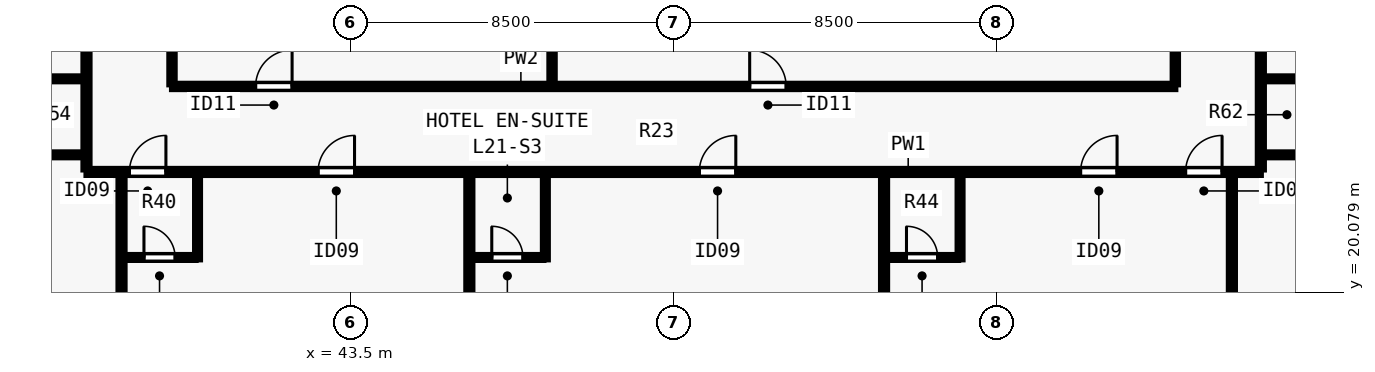
"""IFC4 building model, lengths in metres.
Left out: names, types, materials, properties, quantities, classifications, styles, units other than length and angle.
Written with IfcOpenShell. Run it as: python <this file> out.ifc"""

import sys

from ifc_helpers import new_model, si_unit, direction, frame, frame_2d, origin, place, context, subcontext, project, spatial, rectangle, extrude, element, fill, save


model = new_model("IFC4")
c1 = context("Model", 3, precision=1e-05, world=origin(), true_north=direction((0.0, 1.0)))
c2 = subcontext(c1, "Body", "Model", "MODEL_VIEW")
j1 = project(units=[si_unit("LENGTHUNIT", "METRE"), si_unit("PLANEANGLEUNIT", "RADIAN")], contexts=[c1])
p1 = place(None, origin())
s1 = spatial("IfcSite", under=j1, at=p1, CompositionType="ELEMENT")
p2 = place(p1, origin())
s2 = spatial("IfcBuilding", under=s1, at=p2, CompositionType="ELEMENT")
p3 = place(p2, frame((0.0, 0.0, 79.5)))
s3 = spatial("IfcBuildingStorey", under=s2, at=p3, CompositionType="ELEMENT", Elevation=79.5)
p4 = place(p3, frame((36.55, 23.25, 0.0), z_axis=(0.0, 0.0, 1.0), x_axis=(1.0, 0.0, 0.0)))
e1 = element("IfcWall", 1, at=p4, inside=s3, PredefinedType="PARTITIONING", context=c2, shape_type="SweptSolid", body=[
    extrude(rectangle(XDim=30.9, YDim=0.16, at=frame_2d((15.45, 0.0))), origin(), (0.0, 0.0, 1.0), 3.28),
])
p5 = place(p4, frame((1.13, 0.0, 0.0)))
e2 = element("IfcOpeningElement", 2, at=p5, cuts=e1, PredefinedType="OPENING", context=c2, shape_type="SweptSolid", body=[
    extrude(rectangle(XDim=0.96, YDim=2.15, at=frame_2d((0.48, 1.075))), frame((0.0, 0.09, 0.0), z_axis=(0.0, -1.0, 0.0), x_axis=(1.0, 0.0, 0.0)), (0.0, 0.0, 1.0), 0.18),
])
p6 = place(p4, frame((6.093, 0.0, 0.0)))
e3 = element("IfcOpeningElement", 3, at=p6, cuts=e1, PredefinedType="OPENING", context=c2, shape_type="SweptSolid", body=[
    extrude(rectangle(XDim=0.96, YDim=2.15, at=frame_2d((0.48, 1.075))), frame((0.0, 0.09, 0.0), z_axis=(0.0, -1.0, 0.0), x_axis=(1.0, 0.0, 0.0)), (0.0, 0.0, 1.0), 0.18),
])
p7 = place(p4, frame((16.125, 0.0, 0.0)))
e4 = element("IfcOpeningElement", 4, at=p7, cuts=e1, PredefinedType="OPENING", context=c2, shape_type="SweptSolid", body=[
    extrude(rectangle(XDim=0.96, YDim=2.15, at=frame_2d((0.48, 1.075))), frame((0.0, 0.09, 0.0), z_axis=(0.0, -1.0, 0.0), x_axis=(1.0, 0.0, 0.0)), (0.0, 0.0, 1.0), 0.18),
])
p8 = place(p4, frame((26.157, 0.0, 0.0)))
e5 = element("IfcOpeningElement", 5, at=p8, cuts=e1, PredefinedType="OPENING", context=c2, shape_type="SweptSolid", body=[
    extrude(rectangle(XDim=0.96, YDim=2.15, at=frame_2d((0.48, 1.075))), frame((0.0, 0.09, 0.0), z_axis=(0.0, -1.0, 0.0), x_axis=(1.0, 0.0, 0.0)), (0.0, 0.0, 1.0), 0.18),
])
p9 = place(p4, frame((28.92, 0.0, 0.0)))
e6 = element("IfcOpeningElement", 6, at=p9, cuts=e1, PredefinedType="OPENING", context=c2, shape_type="SweptSolid", body=[
    extrude(rectangle(XDim=0.96, YDim=2.15, at=frame_2d((0.48, 1.075))), frame((0.0, 0.09, 0.0), z_axis=(0.0, -1.0, 0.0), x_axis=(1.0, 0.0, 0.0)), (0.0, 0.0, 1.0), 0.18),
])
p10 = place(p3, frame((36.55, 23.315, 0.0), z_axis=(0.0, 0.0, 1.0), x_axis=(0.0, 1.0, 0.0)))
e7 = element("IfcWall", 7, at=p10, inside=s3, PredefinedType="PARTITIONING", context=c2, shape_type="SweptSolid", body=[
    extrude(rectangle(XDim=31.37, YDim=0.16, at=frame_2d((15.685, 0.0))), origin(), (0.0, 0.0, 1.0), 3.28),
])
p11 = place(p10, frame((4.848, 0.0, 0.0)))
e8 = element("IfcOpeningElement", 8, at=p11, cuts=e7, PredefinedType="OPENING", context=c2, shape_type="SweptSolid", body=[
    extrude(rectangle(XDim=0.96, YDim=2.15, at=frame_2d((0.48, 1.075))), frame((0.0, 0.09, 0.0), z_axis=(0.0, -1.0, 0.0), x_axis=(1.0, 0.0, 0.0)), (0.0, 0.0, 1.0), 0.18),
])
p12 = place(p10, frame((12.39, 0.0, 0.0)))
e9 = element("IfcOpeningElement", 9, at=p12, cuts=e7, PredefinedType="OPENING", context=c2, shape_type="SweptSolid", body=[
    extrude(rectangle(XDim=0.96, YDim=2.15, at=frame_2d((0.48, 1.075))), frame((0.0, 0.09, 0.0), z_axis=(0.0, -1.0, 0.0), x_axis=(1.0, 0.0, 0.0)), (0.0, 0.0, 1.0), 0.18),
])
p13 = place(p10, frame((20.265, 0.0, 0.0)))
e10 = element("IfcOpeningElement", 10, at=p13, cuts=e7, PredefinedType="OPENING", context=c2, shape_type="SweptSolid", body=[
    extrude(rectangle(XDim=0.96, YDim=2.15, at=frame_2d((0.48, 1.075))), frame((0.0, 0.09, 0.0), z_axis=(0.0, -1.0, 0.0), x_axis=(1.0, 0.0, 0.0)), (0.0, 0.0, 1.0), 0.18),
])
p14 = place(p10, frame((28.223, 0.0, 0.0)))
e11 = element("IfcOpeningElement", 11, at=p14, cuts=e7, PredefinedType="OPENING", context=c2, shape_type="SweptSolid", body=[
    extrude(rectangle(XDim=0.96, YDim=2.15, at=frame_2d((0.48, 1.075))), frame((0.0, 0.09, 0.0), z_axis=(0.0, -1.0, 0.0), x_axis=(1.0, 0.0, 0.0)), (0.0, 0.0, 1.0), 0.18),
])
p15 = place(p3, frame((67.45, 23.315, 0.0), z_axis=(0.0, 0.0, 1.0), x_axis=(0.0, 1.0, 0.0)))
e12 = element("IfcWall", 12, at=p15, inside=s3, PredefinedType="PARTITIONING", context=c2, shape_type="SweptSolid", body=[
    extrude(rectangle(XDim=31.37, YDim=0.16, at=frame_2d((15.685, 0.0))), origin(), (0.0, 0.0, 1.0), 3.28),
])
p16 = place(p15, frame((8.474, 0.0, 0.0)))
e13 = element("IfcOpeningElement", 13, at=p16, cuts=e12, PredefinedType="OPENING", context=c2, shape_type="SweptSolid", body=[
    extrude(rectangle(XDim=0.96, YDim=2.15, at=frame_2d((0.48, 1.075))), frame((0.0, 0.09, 0.0), z_axis=(0.0, -1.0, 0.0), x_axis=(1.0, 0.0, 0.0)), (0.0, 0.0, 1.0), 0.18),
])
p17 = place(p15, frame((23.974, 0.0, 0.0)))
e14 = element("IfcOpeningElement", 14, at=p17, cuts=e12, PredefinedType="OPENING", context=c2, shape_type="SweptSolid", body=[
    extrude(rectangle(XDim=0.96, YDim=2.15, at=frame_2d((0.48, 1.075))), frame((0.0, 0.09, 0.0), z_axis=(0.0, -1.0, 0.0), x_axis=(1.0, 0.0, 0.0)), (0.0, 0.0, 1.0), 0.18),
])
p18 = place(p3, frame((38.8, 25.5, 0.0), z_axis=(0.0, 0.0, 1.0), x_axis=(1.0, 0.0, 0.0)))
e15 = element("IfcWall", 15, at=p18, inside=s3, PredefinedType="PARTITIONING", context=c2, shape_type="SweptSolid", body=[
    extrude(rectangle(XDim=26.4, YDim=0.14, at=frame_2d((13.2, 0.0))), origin(), (0.0, 0.0, 1.0), 3.28),
])
p19 = place(p18, frame((2.2, 0.0, 0.0)))
e16 = element("IfcOpeningElement", 16, at=p19, cuts=e15, PredefinedType="OPENING", context=c2, shape_type="SweptSolid", body=[
    extrude(rectangle(XDim=0.96, YDim=2.12, at=frame_2d((0.48, 1.06))), frame((0.0, 0.08, 0.0), z_axis=(0.0, -1.0, 0.0), x_axis=(1.0, 0.0, 0.0)), (0.0, 0.0, 1.0), 0.16),
])
p20 = place(p18, frame((15.2, 0.0, 0.0)))
e17 = element("IfcOpeningElement", 17, at=p20, cuts=e15, PredefinedType="OPENING", context=c2, shape_type="SweptSolid", body=[
    extrude(rectangle(XDim=0.96, YDim=2.12, at=frame_2d((0.48, 1.06))), frame((0.0, 0.08, 0.0), z_axis=(0.0, -1.0, 0.0), x_axis=(1.0, 0.0, 0.0)), (0.0, 0.0, 1.0), 0.16),
])
p21 = place(p3, frame((38.8, 25.555, 0.0), z_axis=(0.0, 0.0, 1.0), x_axis=(0.0, 1.0, 0.0)))
e18 = element("IfcWall", 18, at=p21, inside=s3, PredefinedType="PARTITIONING", context=c2, shape_type="SweptSolid", body=[
    extrude(rectangle(XDim=13.195, YDim=0.14, at=frame_2d((6.598, 0.0))), origin(), (0.0, 0.0, 1.0), 3.28),
])
p22 = place(p21, frame((1.045, 0.0, 0.0)))
e19 = element("IfcOpeningElement", 19, at=p22, cuts=e18, PredefinedType="OPENING", context=c2, shape_type="SweptSolid", body=[
    extrude(rectangle(XDim=0.88, YDim=2.1, at=frame_2d((0.44, 1.05))), frame((0.0, 0.08, 0.0), z_axis=(0.0, -1.0, 0.0), x_axis=(1.0, 0.0, 0.0)), (0.0, 0.0, 1.0), 0.16),
])
p23 = place(p21, frame((10.245, 0.0, 0.0)))
e20 = element("IfcOpeningElement", 20, at=p23, cuts=e18, PredefinedType="OPENING", context=c2, shape_type="SweptSolid", body=[
    extrude(rectangle(XDim=0.88, YDim=2.1, at=frame_2d((0.44, 1.05))), frame((0.0, 0.08, 0.0), z_axis=(0.0, -1.0, 0.0), x_axis=(1.0, 0.0, 0.0)), (0.0, 0.0, 1.0), 0.16),
])
p24 = place(p3, frame((65.2, 25.555, 0.0), z_axis=(0.0, 0.0, 1.0), x_axis=(0.0, 1.0, 0.0)))
e21 = element("IfcWall", 21, at=p24, inside=s3, PredefinedType="PARTITIONING", context=c2, shape_type="SweptSolid", body=[
    extrude(rectangle(XDim=13.195, YDim=0.14, at=frame_2d((6.598, 0.0))), origin(), (0.0, 0.0, 1.0), 3.28),
])
p25 = place(p24, frame((2.445, 0.0, 0.0)))
e22 = element("IfcOpeningElement", 22, at=p25, cuts=e21, PredefinedType="OPENING", context=c2, shape_type="SweptSolid", body=[
    extrude(rectangle(XDim=0.88, YDim=2.1, at=frame_2d((0.44, 1.05))), frame((0.0, 0.08, 0.0), z_axis=(0.0, -1.0, 0.0), x_axis=(1.0, 0.0, 0.0)), (0.0, 0.0, 1.0), 0.16),
])
p26 = place(p3, frame((48.8, 25.555, 0.0), z_axis=(0.0, 0.0, 1.0), x_axis=(0.0, 1.0, 0.0)))
e23 = element("IfcWall", 23, at=p26, inside=s3, PredefinedType="PARTITIONING", context=c2, shape_type="SweptSolid", body=[
    extrude(rectangle(XDim=4.685, YDim=0.14, at=frame_2d((2.343, 0.0))), origin(), (0.0, 0.0, 1.0), 3.28),
])
p27 = place(p3, frame((37.472, 13.845, 0.0), z_axis=(0.0, 0.0, 1.0), x_axis=(0.0, 1.0, 0.0)))
e24 = element("IfcWall", 24, at=p27, inside=s3, PredefinedType="PARTITIONING", context=c2, shape_type="SweptSolid", body=[
    extrude(rectangle(XDim=9.34, YDim=0.16, at=frame_2d((4.67, 0.0))), origin(), (0.0, 0.0, 1.0), 3.28),
])
p28 = place(p3, frame((39.472, 20.95, 0.0), z_axis=(0.0, 0.0, 1.0), x_axis=(0.0, 1.0, 0.0)))
e25 = element("IfcWall", 25, at=p28, inside=s3, PredefinedType="PLUMBINGWALL", context=c2, shape_type="SweptSolid", body=[
    extrude(rectangle(XDim=2.235, YDim=0.13, at=frame_2d((1.118, 0.0))), origin(), (0.0, 0.0, 1.0), 3.28),
])
p29 = place(p3, frame((37.537, 21.0, 0.0), z_axis=(0.0, 0.0, 1.0), x_axis=(1.0, 0.0, 0.0)))
e26 = element("IfcWall", 26, at=p29, inside=s3, PredefinedType="PLUMBINGWALL", context=c2, shape_type="SweptSolid", body=[
    extrude(rectangle(XDim=1.885, YDim=0.13, at=frame_2d((0.942, 0.0))), origin(), (0.0, 0.0, 1.0), 3.28),
])
p30 = place(p29, frame((0.525, 0.0, 0.0)))
e27 = element("IfcOpeningElement", 27, at=p30, cuts=e26, PredefinedType="OPENING", context=c2, shape_type="SweptSolid", body=[
    extrude(rectangle(XDim=0.82, YDim=2.1, at=frame_2d((0.41, 1.05))), frame((0.0, 0.075, 0.0), z_axis=(0.0, -1.0, 0.0), x_axis=(1.0, 0.0, 0.0)), (0.0, 0.0, 1.0), 0.15),
])
p31 = place(p3, frame((46.624, 13.845, 0.0), z_axis=(0.0, 0.0, 1.0), x_axis=(0.0, 1.0, 0.0)))
e28 = element("IfcWall", 28, at=p31, inside=s3, PredefinedType="PARTITIONING", context=c2, shape_type="SweptSolid", body=[
    extrude(rectangle(XDim=9.34, YDim=0.16, at=frame_2d((4.67, 0.0))), origin(), (0.0, 0.0, 1.0), 3.28),
])
p32 = place(p3, frame((48.624, 20.95, 0.0), z_axis=(0.0, 0.0, 1.0), x_axis=(0.0, 1.0, 0.0)))
e29 = element("IfcWall", 29, at=p32, inside=s3, PredefinedType="PLUMBINGWALL", context=c2, shape_type="SweptSolid", body=[
    extrude(rectangle(XDim=2.235, YDim=0.13, at=frame_2d((1.118, 0.0))), origin(), (0.0, 0.0, 1.0), 3.28),
])
p33 = place(p3, frame((46.689, 21.0, 0.0), z_axis=(0.0, 0.0, 1.0), x_axis=(1.0, 0.0, 0.0)))
e30 = element("IfcWall", 30, at=p33, inside=s3, PredefinedType="PLUMBINGWALL", context=c2, shape_type="SweptSolid", body=[
    extrude(rectangle(XDim=1.885, YDim=0.13, at=frame_2d((0.942, 0.0))), origin(), (0.0, 0.0, 1.0), 3.28),
])
p34 = place(p33, frame((0.525, 0.0, 0.0)))
e31 = element("IfcOpeningElement", 31, at=p34, cuts=e30, PredefinedType="OPENING", context=c2, shape_type="SweptSolid", body=[
    extrude(rectangle(XDim=0.82, YDim=2.1, at=frame_2d((0.41, 1.05))), frame((0.0, 0.075, 0.0), z_axis=(0.0, -1.0, 0.0), x_axis=(1.0, 0.0, 0.0)), (0.0, 0.0, 1.0), 0.15),
])
p35 = place(p3, frame((57.536, 13.845, 0.0), z_axis=(0.0, 0.0, 1.0), x_axis=(0.0, 1.0, 0.0)))
e32 = element("IfcWall", 32, at=p35, inside=s3, PredefinedType="PARTITIONING", context=c2, shape_type="SweptSolid", body=[
    extrude(rectangle(XDim=9.34, YDim=0.16, at=frame_2d((4.67, 0.0))), origin(), (0.0, 0.0, 1.0), 3.28),
])
p36 = place(p3, frame((59.536, 20.95, 0.0), z_axis=(0.0, 0.0, 1.0), x_axis=(0.0, 1.0, 0.0)))
e33 = element("IfcWall", 33, at=p36, inside=s3, PredefinedType="PLUMBINGWALL", context=c2, shape_type="SweptSolid", body=[
    extrude(rectangle(XDim=2.235, YDim=0.13, at=frame_2d((1.118, 0.0))), origin(), (0.0, 0.0, 1.0), 3.28),
])
p37 = place(p3, frame((57.601, 21.0, 0.0), z_axis=(0.0, 0.0, 1.0), x_axis=(1.0, 0.0, 0.0)))
e34 = element("IfcWall", 34, at=p37, inside=s3, PredefinedType="PLUMBINGWALL", context=c2, shape_type="SweptSolid", body=[
    extrude(rectangle(XDim=1.885, YDim=0.13, at=frame_2d((0.942, 0.0))), origin(), (0.0, 0.0, 1.0), 3.28),
])
p38 = place(p37, frame((0.525, 0.0, 0.0)))
e35 = element("IfcOpeningElement", 35, at=p38, cuts=e34, PredefinedType="OPENING", context=c2, shape_type="SweptSolid", body=[
    extrude(rectangle(XDim=0.82, YDim=2.1, at=frame_2d((0.41, 1.05))), frame((0.0, 0.075, 0.0), z_axis=(0.0, -1.0, 0.0), x_axis=(1.0, 0.0, 0.0)), (0.0, 0.0, 1.0), 0.15),
])
p39 = place(p3, frame((66.688, 13.845, 0.0), z_axis=(0.0, 0.0, 1.0), x_axis=(0.0, 1.0, 0.0)))
e36 = element("IfcWall", 36, at=p39, inside=s3, PredefinedType="PARTITIONING", context=c2, shape_type="SweptSolid", body=[
    extrude(rectangle(XDim=9.34, YDim=0.16, at=frame_2d((4.67, 0.0))), origin(), (0.0, 0.0, 1.0), 2.439),
])
p40 = place(p3, frame((34.25, 23.7, 0.0), z_axis=(0.0, 0.0, 1.0), x_axis=(1.0, 0.0, 0.0)))
e37 = element("IfcWall", 37, at=p40, inside=s3, PredefinedType="PLUMBINGWALL", context=c2, shape_type="SweptSolid", body=[
    extrude(rectangle(XDim=2.235, YDim=0.13, at=frame_2d((1.118, 0.0))), origin(), (0.0, 0.0, 1.0), 2.849),
])
p41 = place(p3, frame((34.25, 25.7, 0.0), z_axis=(0.0, 0.0, 1.0), x_axis=(1.0, 0.0, 0.0)))
e38 = element("IfcWall", 38, at=p41, inside=s3, PredefinedType="PLUMBINGWALL", context=c2, shape_type="SweptSolid", body=[
    extrude(rectangle(XDim=2.235, YDim=0.13, at=frame_2d((1.118, 0.0))), origin(), (0.0, 0.0, 1.0), 3.28),
])
p42 = place(p3, frame((67.515, 23.7, 0.0), z_axis=(0.0, 0.0, 1.0), x_axis=(1.0, 0.0, 0.0)))
e39 = element("IfcWall", 39, at=p42, inside=s3, PredefinedType="PLUMBINGWALL", context=c2, shape_type="SweptSolid", body=[
    extrude(rectangle(XDim=2.235, YDim=0.13, at=frame_2d((1.118, 0.0))), origin(), (0.0, 0.0, 1.0), 2.849),
])
p43 = place(p3, frame((67.515, 25.7, 0.0), z_axis=(0.0, 0.0, 1.0), x_axis=(1.0, 0.0, 0.0)))
e40 = element("IfcWall", 40, at=p43, inside=s3, PredefinedType="PLUMBINGWALL", context=c2, shape_type="SweptSolid", body=[
    extrude(rectangle(XDim=2.235, YDim=0.13, at=frame_2d((1.118, 0.0))), origin(), (0.0, 0.0, 1.0), 3.28),
])
p44 = place(p19, origin())
e41 = element("IfcDoor", 41, at=p44, inside=s3, OperationType="SINGLE_SWING_RIGHT", PredefinedType="DOOR", context=c2, shape_type="SweptSolid", body=[
    extrude(rectangle(XDim=0.96, YDim=2.12, at=frame_2d((0.48, 1.06))), frame((0.0, 0.025, 0.0), z_axis=(0.0, -1.0, 0.0), x_axis=(1.0, 0.0, 0.0)), (0.0, 0.0, 1.0), 0.05),
])
fill(e16, e41)
p45 = place(p20, origin())
e42 = element("IfcDoor", 42, at=p45, inside=s3, OperationType="SINGLE_SWING_LEFT", PredefinedType="DOOR", context=c2, shape_type="SweptSolid", body=[
    extrude(rectangle(XDim=0.96, YDim=2.12, at=frame_2d((0.48, 1.06))), frame((0.0, 0.025, 0.0), z_axis=(0.0, -1.0, 0.0), x_axis=(1.0, 0.0, 0.0)), (0.0, 0.0, 1.0), 0.05),
])
fill(e17, e42)
p46 = place(p5, origin())
e43 = element("IfcDoor", 43, at=p46, inside=s3, OperationType="SINGLE_SWING_RIGHT", PredefinedType="DOOR", context=c2, shape_type="SweptSolid", body=[
    extrude(rectangle(XDim=0.96, YDim=2.15, at=frame_2d((0.48, 1.075))), frame((0.0, 0.025, 0.0), z_axis=(0.0, -1.0, 0.0), x_axis=(1.0, 0.0, 0.0)), (0.0, 0.0, 1.0), 0.05),
])
fill(e2, e43)
p47 = place(p30, origin())
e44 = element("IfcDoor", 44, at=p47, inside=s3, OperationType="SINGLE_SWING_LEFT", PredefinedType="DOOR", context=c2, shape_type="SweptSolid", body=[
    extrude(rectangle(XDim=0.82, YDim=2.1, at=frame_2d((0.41, 1.05))), frame((0.0, 0.025, 0.0), z_axis=(0.0, -1.0, 0.0), x_axis=(1.0, 0.0, 0.0)), (0.0, 0.0, 1.0), 0.05),
])
fill(e27, e44)
p48 = place(p6, origin())
e45 = element("IfcDoor", 45, at=p48, inside=s3, OperationType="SINGLE_SWING_RIGHT", PredefinedType="DOOR", context=c2, shape_type="SweptSolid", body=[
    extrude(rectangle(XDim=0.96, YDim=2.15, at=frame_2d((0.48, 1.075))), frame((0.0, 0.025, 0.0), z_axis=(0.0, -1.0, 0.0), x_axis=(1.0, 0.0, 0.0)), (0.0, 0.0, 1.0), 0.05),
])
fill(e3, e45)
p49 = place(p34, origin())
e46 = element("IfcDoor", 46, at=p49, inside=s3, OperationType="SINGLE_SWING_LEFT", PredefinedType="DOOR", context=c2, shape_type="SweptSolid", body=[
    extrude(rectangle(XDim=0.82, YDim=2.1, at=frame_2d((0.41, 1.05))), frame((0.0, 0.025, 0.0), z_axis=(0.0, -1.0, 0.0), x_axis=(1.0, 0.0, 0.0)), (0.0, 0.0, 1.0), 0.05),
])
fill(e31, e46)
p50 = place(p7, origin())
e47 = element("IfcDoor", 47, at=p50, inside=s3, OperationType="SINGLE_SWING_RIGHT", PredefinedType="DOOR", context=c2, shape_type="SweptSolid", body=[
    extrude(rectangle(XDim=0.96, YDim=2.15, at=frame_2d((0.48, 1.075))), frame((0.0, 0.025, 0.0), z_axis=(0.0, -1.0, 0.0), x_axis=(1.0, 0.0, 0.0)), (0.0, 0.0, 1.0), 0.05),
])
fill(e4, e47)
p51 = place(p38, origin())
e48 = element("IfcDoor", 48, at=p51, inside=s3, OperationType="SINGLE_SWING_LEFT", PredefinedType="DOOR", context=c2, shape_type="SweptSolid", body=[
    extrude(rectangle(XDim=0.82, YDim=2.1, at=frame_2d((0.41, 1.05))), frame((0.0, 0.025, 0.0), z_axis=(0.0, -1.0, 0.0), x_axis=(1.0, 0.0, 0.0)), (0.0, 0.0, 1.0), 0.05),
])
fill(e35, e48)
p52 = place(p8, origin())
e49 = element("IfcDoor", 49, at=p52, inside=s3, OperationType="SINGLE_SWING_RIGHT", PredefinedType="DOOR", context=c2, shape_type="SweptSolid", body=[
    extrude(rectangle(XDim=0.96, YDim=2.15, at=frame_2d((0.48, 1.075))), frame((0.0, 0.025, 0.0), z_axis=(0.0, -1.0, 0.0), x_axis=(1.0, 0.0, 0.0)), (0.0, 0.0, 1.0), 0.05),
])
fill(e5, e49)
p53 = place(p9, origin())
e50 = element("IfcDoor", 50, at=p53, inside=s3, OperationType="SINGLE_SWING_RIGHT", PredefinedType="DOOR", context=c2, shape_type="SweptSolid", body=[
    extrude(rectangle(XDim=0.96, YDim=2.15, at=frame_2d((0.48, 1.075))), frame((0.0, 0.025, 0.0), z_axis=(0.0, -1.0, 0.0), x_axis=(1.0, 0.0, 0.0)), (0.0, 0.0, 1.0), 0.05),
])
fill(e6, e50)
save(model, sys.argv[1])
